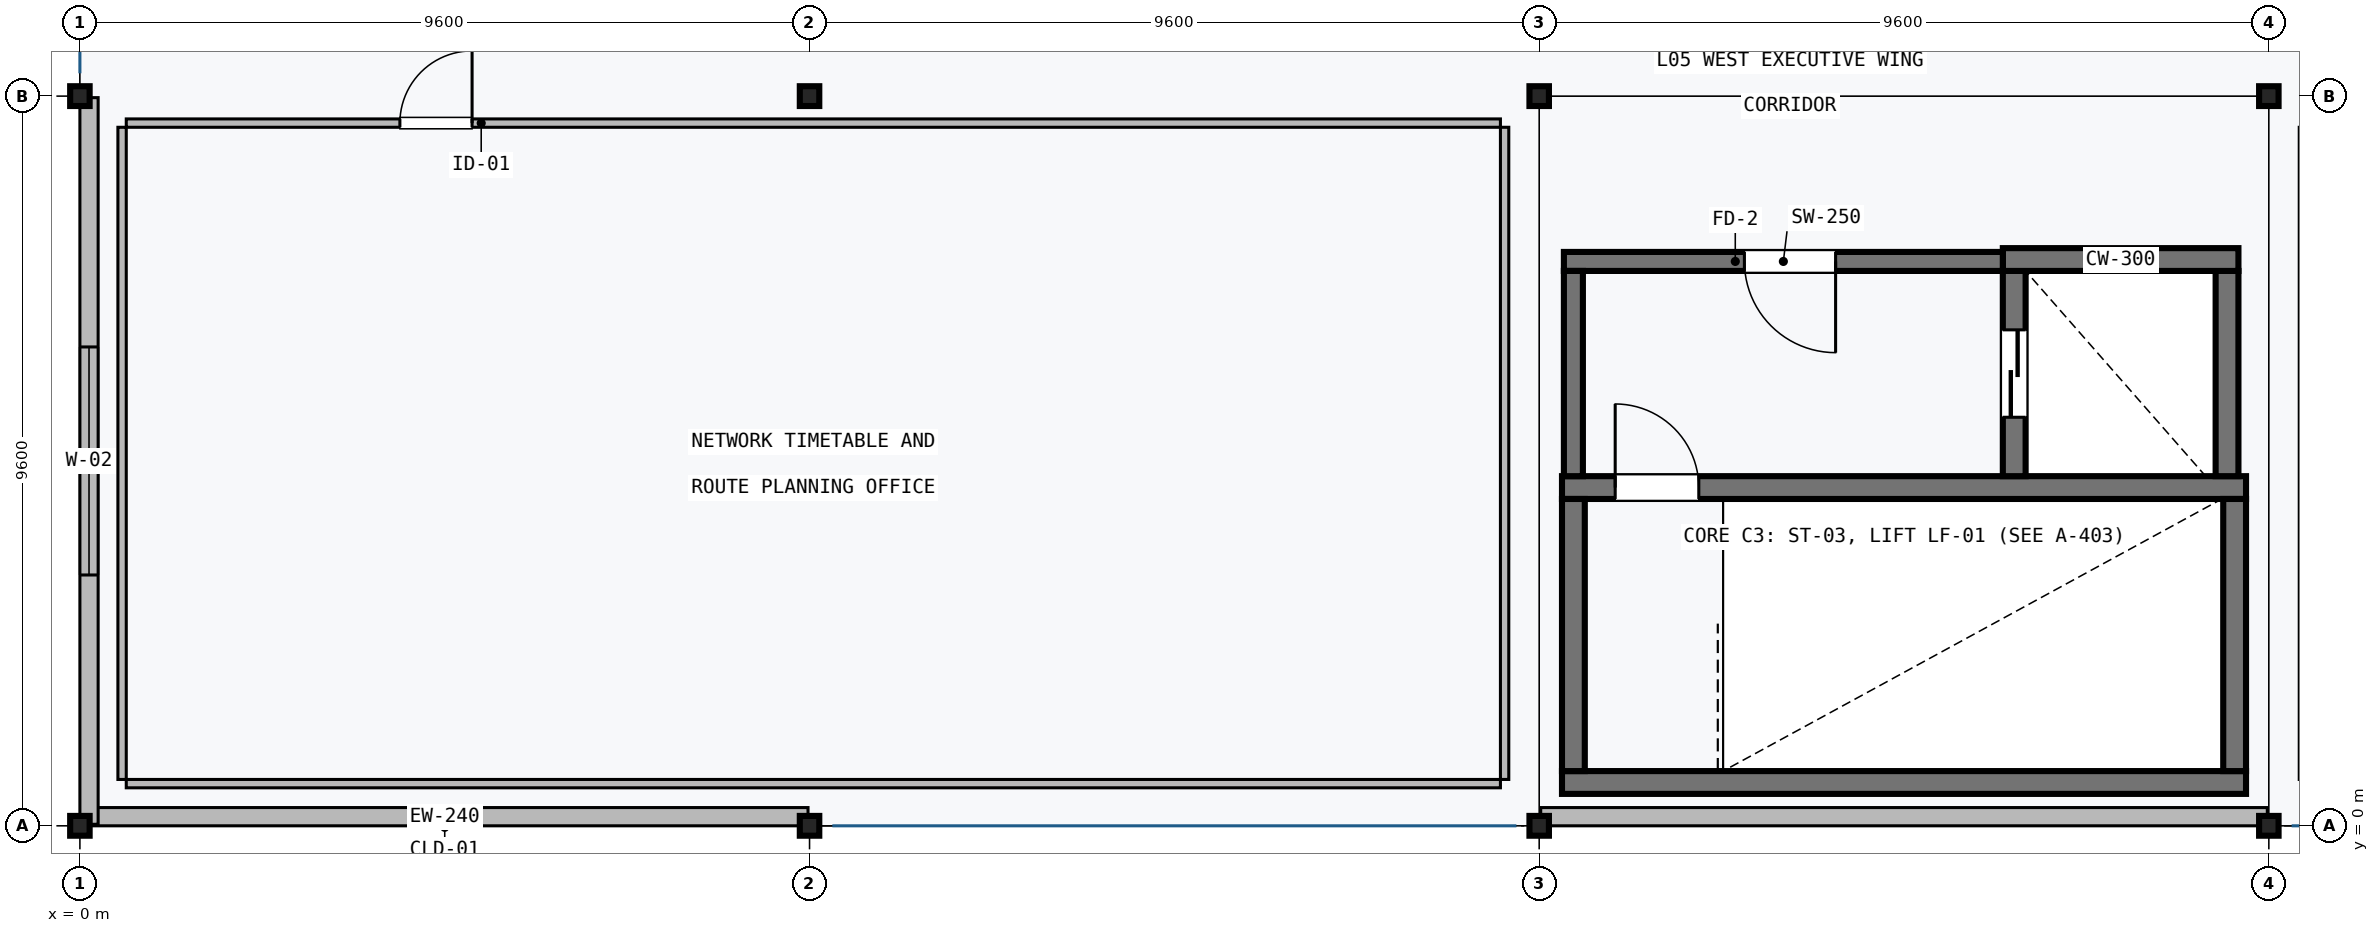
"""IFC4 building model, lengths in metres.
Left out: names, types, materials, properties, quantities, classifications, styles, units other than length and angle.
Written with IfcOpenShell. Run it as: python <this file> out.ifc"""

import sys

from ifc_helpers import new_model, si_unit, direction, frame, frame_2d, origin, origin_2d, place, context, subcontext, project, spatial, rectangle, i_section, extrude, element, fill, save


model = new_model("IFC4")
c1 = context("Model", 3, precision=1e-05, world=origin(), true_north=direction((0.0, 1.0)))
c2 = subcontext(c1, "Body", "Model", "MODEL_VIEW")
j1 = project(units=[si_unit("LENGTHUNIT", "METRE"), si_unit("PLANEANGLEUNIT", "RADIAN")], contexts=[c1])
p1 = place(None, origin())
s1 = spatial("IfcSite", under=j1, at=p1, CompositionType="ELEMENT")
p2 = place(p1, origin())
s2 = spatial("IfcBuilding", under=s1, at=p2, CompositionType="ELEMENT")
p3 = place(p2, frame((0.0, 0.0, 23.1)))
s3 = spatial("IfcBuildingStorey", under=s2, at=p3, CompositionType="ELEMENT", Elevation=23.1)
for number, where, z_axis, x_axis in (
    (1, (0.0, 0.0, 0.0), (0.0, 0.0, 1.0), (1.0, 0.0, 0.0)),
    (2, (0.0, 9.6, 0.0), (0.0, 0.0, 1.0), (1.0, 0.0, 0.0)),
    (3, (9.6, 0.0, 0.0), (0.0, 0.0, 1.0), (1.0, 0.0, 0.0)),
    (4, (9.6, 9.6, 0.0), (0.0, 0.0, 1.0), (1.0, 0.0, 0.0)),
    (5, (19.2, 0.0, 0.0), (0.0, 0.0, 1.0), (1.0, 0.0, 0.0)),
    (6, (19.2, 9.6, 0.0), (0.0, 0.0, 1.0), (1.0, 0.0, 0.0)),
    (7, (28.8, 0.0, 0.0), (0.0, 0.0, 1.0), (1.0, 0.0, 0.0)),
    (8, (28.8, 9.6, 0.0), (0.0, 0.0, 1.0), (1.0, 0.0, 0.0)),
):
    element("IfcColumn", number, at=place(p3, frame(where, z_axis=z_axis, x_axis=x_axis)), inside=s3, PredefinedType="COLUMN", context=c2, shape_type="SweptSolid", body=[
        extrude(i_section(OverallWidth=0.256, OverallDepth=0.26, WebThickness=0.01, FlangeThickness=0.017, FilletRadius=0.013, at=origin_2d()), origin(), (0.0, 0.0, 1.0), 3.92),
    ])
p4 = place(p3, frame((19.5, 0.57, 0.0), z_axis=(0.0, 0.0, 1.0), x_axis=(1.0, 0.0, 0.0)))
e9 = element("IfcWall", 9, at=p4, inside=s3, PredefinedType="SHEAR", context=c2, shape_type="SweptSolid", body=[
    extrude(rectangle(XDim=9.0, YDim=0.3, at=frame_2d((4.5, 0.0))), origin(), (0.0, 0.0, 1.0), 3.92),
])
p5 = place(p3, frame((28.5, 4.45, 0.0), z_axis=(0.0, 0.0, 1.0), x_axis=(-1.0, 0.0, 0.0)))
e10 = element("IfcWall", 10, at=p5, inside=s3, PredefinedType="SHEAR", context=c2, shape_type="SweptSolid", body=[
    extrude(rectangle(XDim=9.0, YDim=0.3, at=frame_2d((4.5, 0.0))), origin(), (0.0, 0.0, 1.0), 4.2),
])
p6 = place(p5, frame((7.2, 0.0, 0.0)))
e11 = element("IfcOpeningElement", 11, at=p6, cuts=e10, PredefinedType="OPENING", context=c2, shape_type="SweptSolid", body=[
    extrude(rectangle(XDim=1.1, YDim=2.15, at=frame_2d((0.55, 1.075))), frame((0.0, 0.16, 0.0), z_axis=(0.0, -1.0, 0.0), x_axis=(1.0, 0.0, 0.0)), (0.0, 0.0, 1.0), 0.32),
])
for number, where, z_axis, x_axis in (
    (12, (19.65, 0.72, 0.0), (0.0, 0.0, 1.0), (0.0, 1.0, 0.0)),
    (13, (28.35, 4.3, 0.0), (0.0, 0.0, 1.0), (0.0, -1.0, 0.0)),
):
    element("IfcWall", number, at=place(p3, frame(where, z_axis=z_axis, x_axis=x_axis)), inside=s3, PredefinedType="SHEAR", context=c2, shape_type="SweptSolid", body=[
        extrude(rectangle(XDim=3.58, YDim=0.3, at=frame_2d((1.79, 0.0))), origin(), (0.0, 0.0, 1.0), 3.92),
    ])
p7 = place(p3, frame((25.45, 7.3, 0.0), z_axis=(0.0, 0.0, 1.0), x_axis=(0.0, -1.0, 0.0)))
e14 = element("IfcWall", 14, at=p7, inside=s3, PredefinedType="SHEAR", context=c2, shape_type="SweptSolid", body=[
    extrude(rectangle(XDim=2.7, YDim=0.3, at=frame_2d((1.35, 0.0))), origin(), (0.0, 0.0, 1.0), 4.2),
])
p8 = place(p7, frame((0.775, 0.0, 0.0)))
e15 = element("IfcOpeningElement", 15, at=p8, cuts=e14, PredefinedType="OPENING", context=c2, shape_type="SweptSolid", body=[
    extrude(rectangle(XDim=1.15, YDim=2.1, at=frame_2d((0.575, 1.05))), frame((0.0, 0.16, 0.0), z_axis=(0.0, -1.0, 0.0), x_axis=(1.0, 0.0, 0.0)), (0.0, 0.0, 1.0), 0.32),
])
p9 = place(p3, frame((28.25, 4.6, 0.0), z_axis=(0.0, 0.0, 1.0), x_axis=(0.0, 1.0, 0.0)))
e16 = element("IfcWall", 16, at=p9, inside=s3, PredefinedType="SHEAR", context=c2, shape_type="SweptSolid", body=[
    extrude(rectangle(XDim=2.7, YDim=0.3, at=frame_2d((1.35, 0.0))), origin(), (0.0, 0.0, 1.0), 4.2),
])
p10 = place(p3, frame((25.3, 7.45, 0.0), z_axis=(0.0, 0.0, 1.0), x_axis=(1.0, 0.0, 0.0)))
e17 = element("IfcWall", 17, at=p10, inside=s3, PredefinedType="SHEAR", context=c2, shape_type="SweptSolid", body=[
    extrude(rectangle(XDim=3.1, YDim=0.3, at=frame_2d((1.55, 0.0))), origin(), (0.0, 0.0, 1.0), 4.2),
])
p11 = place(p3, frame((25.3, 7.425, 0.0), z_axis=(0.0, 0.0, 1.0), x_axis=(-1.0, 0.0, 0.0)))
e18 = element("IfcWall", 18, at=p11, inside=s3, PredefinedType="SHEAR", context=c2, shape_type="SweptSolid", body=[
    extrude(rectangle(XDim=5.775, YDim=0.25, at=frame_2d((2.888, 0.0))), origin(), (0.0, 0.0, 1.0), 3.92),
])
p12 = place(p11, frame((2.2, 0.0, 0.0)))
e19 = element("IfcOpeningElement", 19, at=p12, cuts=e18, PredefinedType="OPENING", context=c2, shape_type="SweptSolid", body=[
    extrude(rectangle(XDim=1.2, YDim=2.15, at=frame_2d((0.6, 1.075))), frame((0.0, 0.135, 0.0), z_axis=(0.0, -1.0, 0.0), x_axis=(1.0, 0.0, 0.0)), (0.0, 0.0, 1.0), 0.27),
])
p13 = place(p3, frame((19.65, 4.6, 0.0), z_axis=(0.0, 0.0, 1.0), x_axis=(0.0, 1.0, 0.0)))
e20 = element("IfcWall", 20, at=p13, inside=s3, PredefinedType="SHEAR", context=c2, shape_type="SweptSolid", body=[
    extrude(rectangle(XDim=2.7, YDim=0.25, at=frame_2d((1.35, 0.0))), origin(), (0.0, 0.0, 1.0), 3.92),
])
p14 = place(p3, frame((9.58, 0.12, 0.0), z_axis=(0.0, 0.0, 1.0), x_axis=(-1.0, 0.0, 0.0)))
e21 = element("IfcWall", 21, at=p14, inside=s3, PredefinedType="SOLIDWALL", context=c2, shape_type="SweptSolid", body=[
    extrude(rectangle(XDim=9.56, YDim=0.24, at=frame_2d((4.78, 0.0))), origin(), (0.0, 0.0, 1.0), 3.63),
])
p15 = place(p3, frame((0.12, 0.02, 0.0), z_axis=(0.0, 0.0, 1.0), x_axis=(0.0, 1.0, 0.0)))
e22 = element("IfcWall", 22, at=p15, inside=s3, PredefinedType="SOLIDWALL", context=c2, shape_type="SweptSolid", body=[
    extrude(rectangle(XDim=9.56, YDim=0.24, at=frame_2d((4.78, 0.0))), origin(), (0.0, 0.0, 1.0), 3.463),
])
p16 = place(p15, frame((3.28, 0.0, 0.9)))
e23 = element("IfcOpeningElement", 23, at=p16, cuts=e22, PredefinedType="OPENING", context=c2, shape_type="SweptSolid", body=[
    extrude(rectangle(XDim=3.0, YDim=2.1, at=frame_2d((1.5, 1.05))), frame((0.0, 0.13, 0.0), z_axis=(0.0, -1.0, 0.0), x_axis=(1.0, 0.0, 0.0)), (0.0, 0.0, 1.0), 0.26),
])
p17 = place(p3, frame((28.78, 0.12, 0.0), z_axis=(0.0, 0.0, 1.0), x_axis=(-1.0, 0.0, 0.0)))
e24 = element("IfcWall", 24, at=p17, inside=s3, PredefinedType="SOLIDWALL", context=c2, shape_type="SweptSolid", body=[
    extrude(rectangle(XDim=9.56, YDim=0.24, at=frame_2d((4.78, 0.0))), origin(), (0.0, 0.0, 1.0), 3.63),
])
p18 = place(p3, frame((29.255, 0.61, 0.0), z_axis=(0.0, 0.0, 1.0), x_axis=(0.0, 1.0, 0.0)))
e25 = element("IfcWall", 25, at=p18, inside=s3, PredefinedType="PARTITIONING", context=c2, shape_type="SweptSolid", body=[
    extrude(rectangle(XDim=8.58, YDim=0.11, at=frame_2d((4.29, 0.0))), origin(), (0.0, 0.0, 1.0), 3.56),
])
p19 = place(p3, frame((18.69, 0.555, 0.0), z_axis=(0.0, 0.0, 1.0), x_axis=(-1.0, 0.0, 0.0)))
e26 = element("IfcWall", 26, at=p19, inside=s3, PredefinedType="PARTITIONING", context=c2, shape_type="SweptSolid", body=[
    extrude(rectangle(XDim=18.08, YDim=0.11, at=frame_2d((9.04, 0.0))), origin(), (0.0, 0.0, 1.0), 3.453),
])
p20 = place(p3, frame((0.61, 9.245, 0.0), z_axis=(0.0, 0.0, 1.0), x_axis=(1.0, 0.0, 0.0)))
e27 = element("IfcWall", 27, at=p20, inside=s3, PredefinedType="PARTITIONING", context=c2, shape_type="SweptSolid", body=[
    extrude(rectangle(XDim=18.08, YDim=0.11, at=frame_2d((9.04, 0.0))), origin(), (0.0, 0.0, 1.0), 3.453),
])
p21 = place(p20, frame((3.6, 0.0, 0.0)))
e28 = element("IfcOpeningElement", 28, at=p21, cuts=e27, PredefinedType="OPENING", context=c2, shape_type="SweptSolid", body=[
    extrude(rectangle(XDim=0.95, YDim=2.15, at=frame_2d((0.475, 1.075))), frame((0.0, 0.065, 0.0), z_axis=(0.0, -1.0, 0.0), x_axis=(1.0, 0.0, 0.0)), (0.0, 0.0, 1.0), 0.13),
])
for number, where, z_axis, x_axis in (
    (29, (0.555, 0.61, 0.0), (0.0, 0.0, 1.0), (0.0, 1.0, 0.0)),
    (30, (18.745, 9.19, 0.0), (0.0, 0.0, 1.0), (0.0, -1.0, 0.0)),
):
    element("IfcWall", number, at=place(p3, frame(where, z_axis=z_axis, x_axis=x_axis)), inside=s3, PredefinedType="PARTITIONING", context=c2, shape_type="SweptSolid", body=[
        extrude(rectangle(XDim=8.58, YDim=0.11, at=frame_2d((4.29, 0.0))), origin(), (0.0, 0.0, 1.0), 3.56),
    ])
p22 = place(p6, frame((1.1, 0.0, 0.0), z_axis=(0.0, 0.0, 1.0), x_axis=(-1.0, 0.0, 0.0)))
e31 = element("IfcDoor", 31, at=p22, inside=s3, OperationType="SINGLE_SWING_RIGHT", PredefinedType="DOOR", context=c2, shape_type="SweptSolid", body=[
    extrude(rectangle(XDim=1.1, YDim=2.15, at=frame_2d((0.55, 1.075))), frame((0.0, 0.025, 0.0), z_axis=(0.0, -1.0, 0.0), x_axis=(1.0, 0.0, 0.0)), (0.0, 0.0, 1.0), 0.05),
])
fill(e11, e31)
p23 = place(p8, frame((1.15, 0.0, 0.0), z_axis=(0.0, 0.0, 1.0), x_axis=(-1.0, 0.0, 0.0)))
e32 = element("IfcDoor", 32, at=p23, inside=s3, OperationType="DOUBLE_DOOR_SLIDING", PredefinedType="DOOR", context=c2, shape_type="SweptSolid", body=[
    extrude(rectangle(XDim=1.15, YDim=2.1, at=frame_2d((0.575, 1.05))), frame((0.0, 0.025, 0.0), z_axis=(0.0, -1.0, 0.0), x_axis=(1.0, 0.0, 0.0)), (0.0, 0.0, 1.0), 0.05),
])
fill(e15, e32)
p24 = place(p12, origin())
e33 = element("IfcDoor", 33, at=p24, inside=s3, OperationType="SINGLE_SWING_LEFT", PredefinedType="DOOR", context=c2, shape_type="SweptSolid", body=[
    extrude(rectangle(XDim=1.2, YDim=2.15, at=frame_2d((0.6, 1.075))), frame((0.0, 0.025, 0.0), z_axis=(0.0, -1.0, 0.0), x_axis=(1.0, 0.0, 0.0)), (0.0, 0.0, 1.0), 0.05),
])
fill(e19, e33)
p25 = place(p16, origin())
e34 = element("IfcWindow", 34, at=p25, inside=s3, PartitioningType="SINGLE_PANEL", PredefinedType="WINDOW", context=c2, shape_type="SweptSolid", body=[
    extrude(rectangle(XDim=3.0, YDim=2.1, at=frame_2d((1.5, 1.05))), frame((0.0, 0.03, 0.0), z_axis=(0.0, -1.0, 0.0), x_axis=(1.0, 0.0, 0.0)), (0.0, 0.0, 1.0), 0.06),
])
fill(e23, e34)
p26 = place(p21, origin())
e35 = element("IfcDoor", 35, at=p26, inside=s3, OperationType="SINGLE_SWING_RIGHT", PredefinedType="DOOR", context=c2, shape_type="SweptSolid", body=[
    extrude(rectangle(XDim=0.95, YDim=2.15, at=frame_2d((0.475, 1.075))), frame((0.0, 0.025, 0.0), z_axis=(0.0, -1.0, 0.0), x_axis=(1.0, 0.0, 0.0)), (0.0, 0.0, 1.0), 0.05),
])
fill(e28, e35)
save(model, sys.argv[1])
